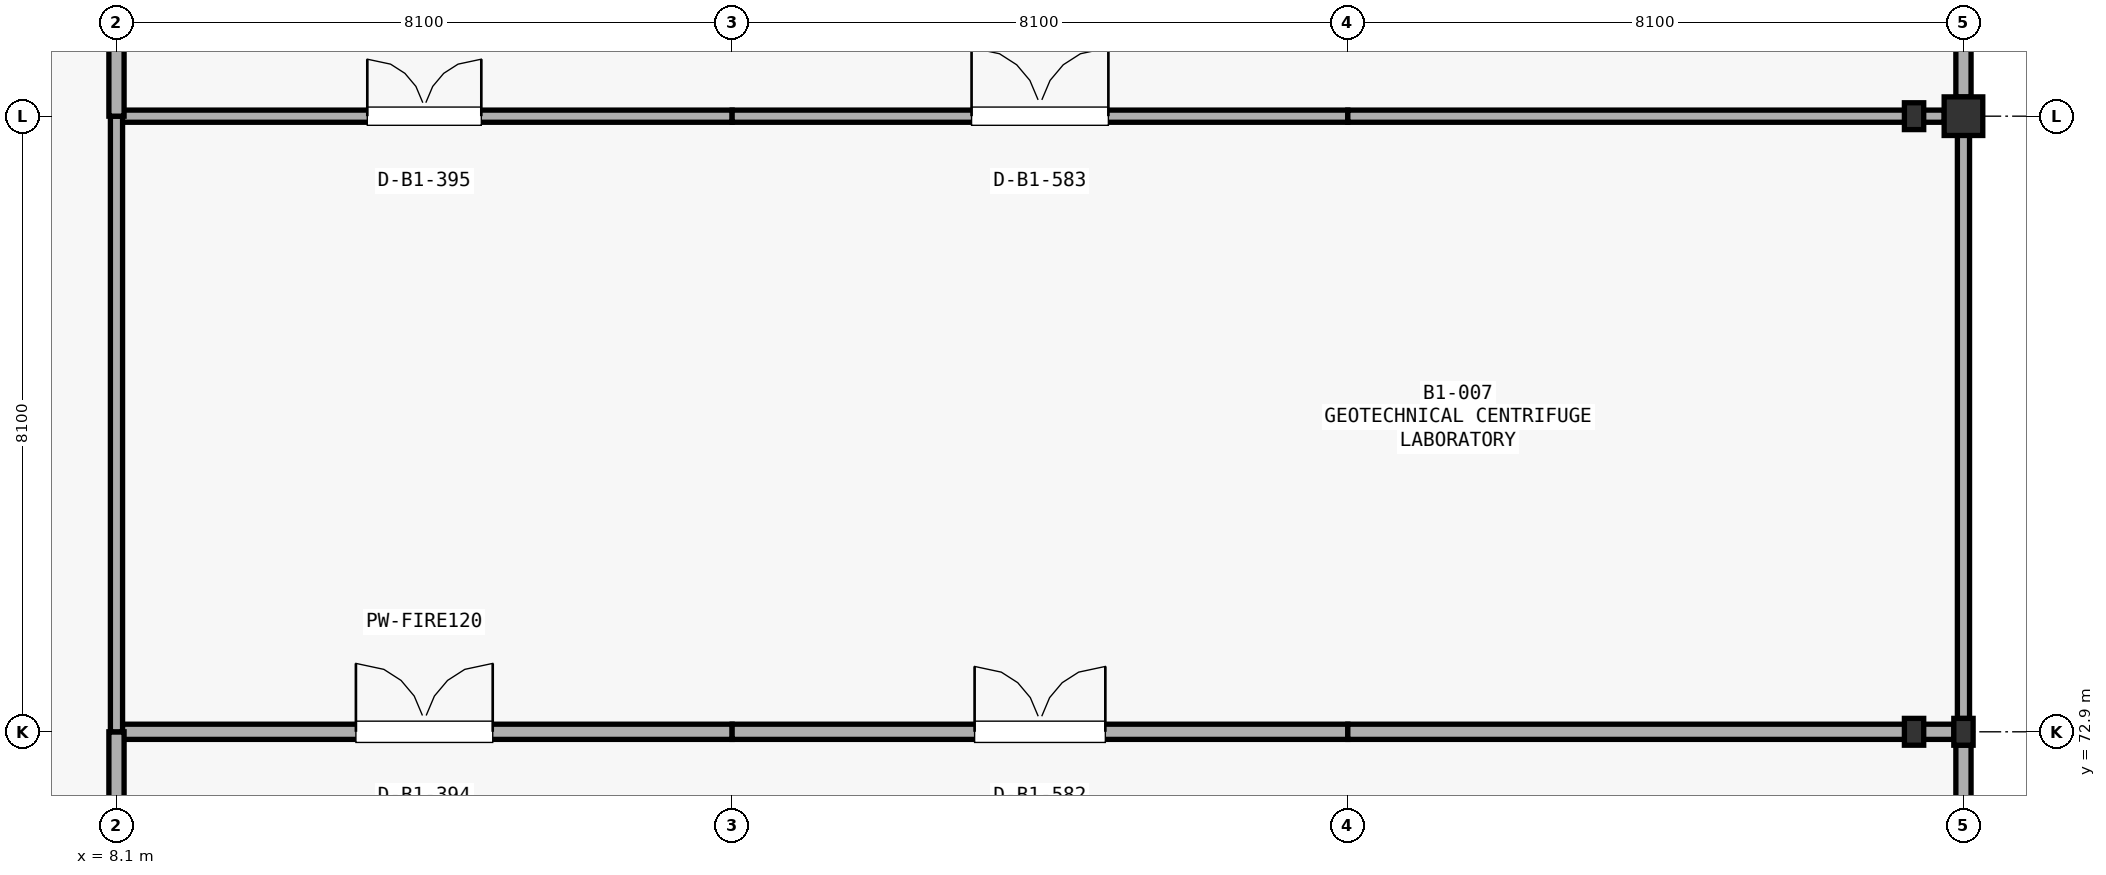
"""IFC4 building model, lengths in metres.
Left out: names, types, materials, properties, quantities, classifications, styles, units other than length and angle.
Written with IfcOpenShell. Run it as: python <this file> out.ifc"""

import sys

from ifc_helpers import new_model, si_unit, direction, frame, frame_2d, origin, origin_2d, place, context, subcontext, project, spatial, rectangle, hollow_circle, i_section, extrude, element, fill, save


model = new_model("IFC4")
c1 = context("Model", 3, precision=1e-05, world=origin(), true_north=direction((0.0, 1.0)))
c2 = subcontext(c1, "Body", "Model", "MODEL_VIEW")
j1 = project(units=[si_unit("LENGTHUNIT", "METRE"), si_unit("PLANEANGLEUNIT", "RADIAN")], contexts=[c1])
p1 = place(None, origin())
s1 = spatial("IfcSite", under=j1, at=p1, CompositionType="ELEMENT")
p2 = place(p1, origin())
s2 = spatial("IfcBuilding", under=s1, at=p2, CompositionType="ELEMENT")
p3 = place(p2, frame((0.0, 0.0, -5.1)))
s3 = spatial("IfcBuildingStorey", under=s2, at=p3, CompositionType="ELEMENT", Elevation=-5.1)
p4 = place(p3, frame((32.4, 72.9, 0.0), z_axis=(0.0, 0.0, 1.0), x_axis=(1.0, 0.0, 0.0)))
e1 = element("IfcColumn", 1, at=p4, inside=s3, PredefinedType="PILASTER", context=c2, shape_type="SweptSolid", body=[
    extrude(i_section(OverallWidth=0.254, OverallDepth=0.353, WebThickness=0.01, FlangeThickness=0.016, FilletRadius=0.016, at=origin_2d()), origin(), (0.0, 0.0, 1.0), 5.1),
])
p5 = place(p3, frame((32.4, 81.0, 0.0), z_axis=(0.0, 0.0, 1.0), x_axis=(1.0, 0.0, 0.0)))
e2 = element("IfcColumn", 2, at=p5, inside=s3, PredefinedType="COLUMN", context=c2, shape_type="SweptSolid", body=[
    extrude(hollow_circle(Radius=0.254, WallThickness=0.019, at=origin_2d()), origin(), (0.0, 0.0, 1.0), 5.1),
])
for number, where, z_axis, x_axis in (
    (3, (31.75, 72.9, 0.0), (0.0, 0.0, 1.0), (1.0, 0.0, 0.0)),
    (4, (31.75, 81.0, 0.0), (0.0, 0.0, 1.0), (1.0, 0.0, 0.0)),
):
    element("IfcColumn", number, at=place(p3, frame(where, z_axis=z_axis, x_axis=x_axis)), inside=s3, PredefinedType="PILASTER", context=c2, shape_type="SweptSolid", body=[
        extrude(i_section(OverallWidth=0.254, OverallDepth=0.353, WebThickness=0.01, FlangeThickness=0.016, FilletRadius=0.016, at=origin_2d()), origin(), (0.0, 0.0, 1.0), 4.724),
    ])
p6 = place(p3, frame((8.1, 72.9, 0.0), z_axis=(0.0, 0.0, 1.0), x_axis=(1.0, 0.0, 0.0)))
e5 = element("IfcWall", 5, at=p6, inside=s3, PredefinedType="PARTITIONING", context=c2, shape_type="SweptSolid", body=[
    extrude(rectangle(XDim=8.1, YDim=0.2, at=frame_2d((4.05, 0.0))), origin(), (0.0, 0.0, 1.0), 4.722),
])
p7 = place(p6, frame((3.15, 0.0, 0.0)))
e6 = element("IfcOpeningElement", 6, at=p7, cuts=e5, PredefinedType="OPENING", context=c2, shape_type="SweptSolid", body=[
    extrude(rectangle(XDim=1.8, YDim=2.4, at=frame_2d((0.9, 1.2))), frame((0.0, 0.11, 0.0), z_axis=(0.0, -1.0, 0.0), x_axis=(1.0, 0.0, 0.0)), (0.0, 0.0, 1.0), 0.22),
])
p8 = place(p3, frame((16.2, 72.9, 0.0), z_axis=(0.0, 0.0, 1.0), x_axis=(1.0, 0.0, 0.0)))
e7 = element("IfcWall", 7, at=p8, inside=s3, PredefinedType="PARTITIONING", context=c2, shape_type="SweptSolid", body=[
    extrude(rectangle(XDim=8.1, YDim=0.2, at=frame_2d((4.05, 0.0))), origin(), (0.0, 0.0, 1.0), 4.722),
])
p9 = place(p8, frame((3.19, 0.0, 0.0)))
e8 = element("IfcOpeningElement", 8, at=p9, cuts=e7, PredefinedType="OPENING", context=c2, shape_type="SweptSolid", body=[
    extrude(rectangle(XDim=1.72, YDim=2.3, at=frame_2d((0.86, 1.15))), frame((0.0, 0.11, 0.0), z_axis=(0.0, -1.0, 0.0), x_axis=(1.0, 0.0, 0.0)), (0.0, 0.0, 1.0), 0.22),
])
p10 = place(p3, frame((24.3, 72.9, 0.0), z_axis=(0.0, 0.0, 1.0), x_axis=(1.0, 0.0, 0.0)))
e9 = element("IfcWall", 9, at=p10, inside=s3, PredefinedType="PARTITIONING", context=c2, shape_type="SweptSolid", body=[
    extrude(rectangle(XDim=7.975, YDim=0.2, at=frame_2d((3.987, 0.0))), origin(), (0.0, 0.0, 1.0), 4.722),
])
p11 = place(p3, frame((32.4, 65.052, 0.0), z_axis=(0.0, 0.0, 1.0), x_axis=(0.0, 1.0, 0.0)))
e10 = element("IfcWall", 10, at=p11, inside=s3, PredefinedType="PARTITIONING", context=c2, shape_type="SweptSolid", body=[
    extrude(rectangle(XDim=7.674, YDim=0.2, at=frame_2d((3.837, 0.0))), origin(), (0.0, 0.0, 1.0), 4.417),
])
p12 = place(p3, frame((8.1, 64.8, 0.0), z_axis=(0.0, 0.0, 1.0), x_axis=(0.0, 1.0, 0.0)))
e11 = element("IfcWall", 11, at=p12, inside=s3, PredefinedType="PARTITIONING", context=c2, shape_type="SweptSolid", body=[
    extrude(rectangle(XDim=8.1, YDim=0.2, at=frame_2d((4.05, 0.0))), origin(), (0.0, 0.0, 1.0), 4.722),
])
p13 = place(p3, frame((8.1, 81.0, 0.0), z_axis=(0.0, 0.0, 1.0), x_axis=(1.0, 0.0, 0.0)))
e12 = element("IfcWall", 12, at=p13, inside=s3, PredefinedType="PARTITIONING", context=c2, shape_type="SweptSolid", body=[
    extrude(rectangle(XDim=8.1, YDim=0.16, at=frame_2d((4.05, 0.0))), origin(), (0.0, 0.0, 1.0), 4.722),
])
p14 = place(p13, frame((3.3, 0.0, 0.0)))
e13 = element("IfcOpeningElement", 13, at=p14, cuts=e12, PredefinedType="OPENING", context=c2, shape_type="SweptSolid", body=[
    extrude(rectangle(XDim=1.5, YDim=2.2, at=frame_2d((0.75, 1.1))), frame((0.0, 0.09, 0.0), z_axis=(0.0, -1.0, 0.0), x_axis=(1.0, 0.0, 0.0)), (0.0, 0.0, 1.0), 0.18),
])
p15 = place(p3, frame((16.2, 81.0, 0.0), z_axis=(0.0, 0.0, 1.0), x_axis=(1.0, 0.0, 0.0)))
e14 = element("IfcWall", 14, at=p15, inside=s3, PredefinedType="PARTITIONING", context=c2, shape_type="SweptSolid", body=[
    extrude(rectangle(XDim=8.1, YDim=0.16, at=frame_2d((4.05, 0.0))), origin(), (0.0, 0.0, 1.0), 4.722),
])
p16 = place(p15, frame((3.15, 0.0, 0.0)))
e15 = element("IfcOpeningElement", 15, at=p16, cuts=e14, PredefinedType="OPENING", context=c2, shape_type="SweptSolid", body=[
    extrude(rectangle(XDim=1.8, YDim=2.4, at=frame_2d((0.9, 1.2))), frame((0.0, 0.09, 0.0), z_axis=(0.0, -1.0, 0.0), x_axis=(1.0, 0.0, 0.0)), (0.0, 0.0, 1.0), 0.18),
])
p17 = place(p3, frame((24.3, 81.0, 0.0), z_axis=(0.0, 0.0, 1.0), x_axis=(1.0, 0.0, 0.0)))
e16 = element("IfcWall", 16, at=p17, inside=s3, PredefinedType="PARTITIONING", context=c2, shape_type="SweptSolid", body=[
    extrude(rectangle(XDim=7.848, YDim=0.16, at=frame_2d((3.924, 0.0))), origin(), (0.0, 0.0, 1.0), 4.722),
])
p18 = place(p3, frame((32.4, 73.074, 0.0), z_axis=(0.0, 0.0, 1.0), x_axis=(0.0, 1.0, 0.0)))
e17 = element("IfcWall", 17, at=p18, inside=s3, PredefinedType="PARTITIONING", context=c2, shape_type="SweptSolid", body=[
    extrude(rectangle(XDim=7.674, YDim=0.16, at=frame_2d((3.837, 0.0))), origin(), (0.0, 0.0, 1.0), 4.262),
])
p19 = place(p3, frame((8.1, 72.9, 0.0), z_axis=(0.0, 0.0, 1.0), x_axis=(0.0, 1.0, 0.0)))
e18 = element("IfcWall", 18, at=p19, inside=s3, PredefinedType="PARTITIONING", context=c2, shape_type="SweptSolid", body=[
    extrude(rectangle(XDim=8.1, YDim=0.16, at=frame_2d((4.05, 0.0))), origin(), (0.0, 0.0, 1.0), 4.722),
])
p20 = place(p3, frame((32.4, 81.252, 0.0), z_axis=(0.0, 0.0, 1.0), x_axis=(0.0, 1.0, 0.0)))
e19 = element("IfcWall", 19, at=p20, inside=s3, PredefinedType="PARTITIONING", context=c2, shape_type="SweptSolid", body=[
    extrude(rectangle(XDim=7.674, YDim=0.2, at=frame_2d((3.837, 0.0))), origin(), (0.0, 0.0, 1.0), 4.312),
])
p21 = place(p3, frame((8.1, 81.0, 0.0), z_axis=(0.0, 0.0, 1.0), x_axis=(0.0, 1.0, 0.0)))
e20 = element("IfcWall", 20, at=p21, inside=s3, PredefinedType="PARTITIONING", context=c2, shape_type="SweptSolid", body=[
    extrude(rectangle(XDim=7.777, YDim=0.2, at=frame_2d((3.889, 0.0))), origin(), (0.0, 0.0, 1.0), 4.722),
])
p22 = place(p21, frame((2.989, 0.0, 0.0)))
e21 = element("IfcOpeningElement", 21, at=p22, cuts=e20, PredefinedType="OPENING", context=c2, shape_type="SweptSolid", body=[
    extrude(rectangle(XDim=1.8, YDim=2.4, at=frame_2d((0.9, 1.2))), frame((0.0, 0.11, 0.0), z_axis=(0.0, -1.0, 0.0), x_axis=(1.0, 0.0, 0.0)), (0.0, 0.0, 1.0), 0.22),
])
p23 = place(p7, origin())
e22 = element("IfcDoor", 22, at=p23, inside=s3, OperationType="DOUBLE_SWING_LEFT", PredefinedType="DOOR", context=c2, shape_type="SweptSolid", body=[
    extrude(rectangle(XDim=1.8, YDim=2.4, at=frame_2d((0.9, 1.2))), frame((0.0, 0.025, 0.0), z_axis=(0.0, -1.0, 0.0), x_axis=(1.0, 0.0, 0.0)), (0.0, 0.0, 1.0), 0.05),
])
fill(e6, e22)
p24 = place(p14, origin())
e23 = element("IfcDoor", 23, at=p24, inside=s3, OperationType="DOUBLE_SWING_LEFT", PredefinedType="DOOR", context=c2, shape_type="SweptSolid", body=[
    extrude(rectangle(XDim=1.5, YDim=2.2, at=frame_2d((0.75, 1.1))), frame((0.0, 0.025, 0.0), z_axis=(0.0, -1.0, 0.0), x_axis=(1.0, 0.0, 0.0)), (0.0, 0.0, 1.0), 0.05),
])
fill(e13, e23)
p25 = place(p9, origin())
e24 = element("IfcDoor", 24, at=p25, inside=s3, OperationType="DOUBLE_SWING_LEFT", PredefinedType="DOOR", context=c2, shape_type="SweptSolid", body=[
    extrude(rectangle(XDim=1.72, YDim=2.3, at=frame_2d((0.86, 1.15))), frame((0.0, 0.025, 0.0), z_axis=(0.0, -1.0, 0.0), x_axis=(1.0, 0.0, 0.0)), (0.0, 0.0, 1.0), 0.05),
])
fill(e8, e24)
p26 = place(p16, origin())
e25 = element("IfcDoor", 25, at=p26, inside=s3, OperationType="DOUBLE_SWING_LEFT", PredefinedType="DOOR", context=c2, shape_type="SweptSolid", body=[
    extrude(rectangle(XDim=1.8, YDim=2.4, at=frame_2d((0.9, 1.2))), frame((0.0, 0.025, 0.0), z_axis=(0.0, -1.0, 0.0), x_axis=(1.0, 0.0, 0.0)), (0.0, 0.0, 1.0), 0.05),
])
fill(e15, e25)
save(model, sys.argv[1])
